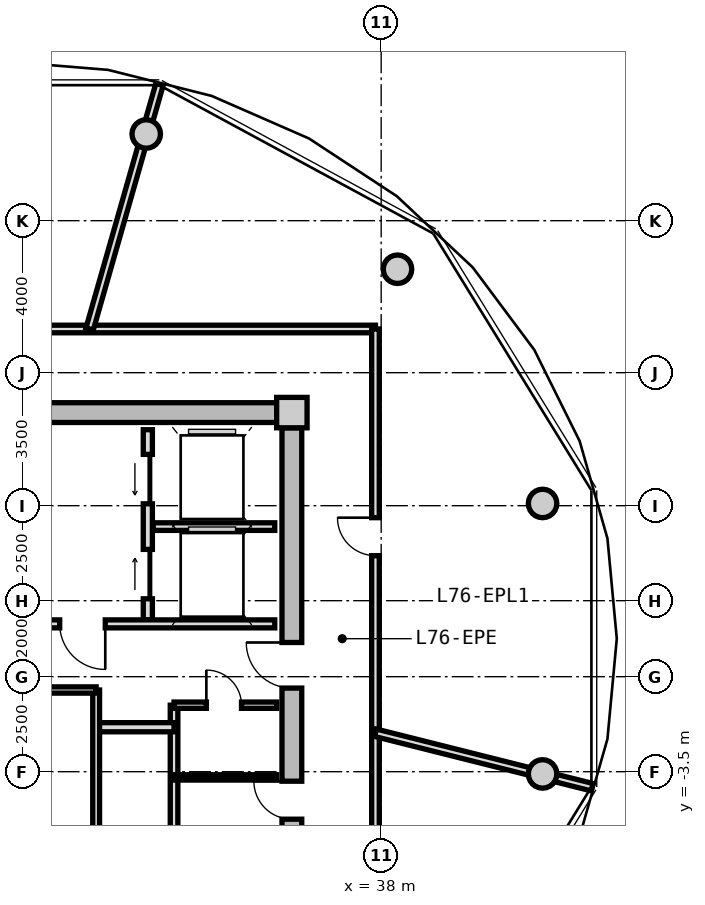
"""IFC4 building model, lengths in metres.
Left out: names, types, materials, properties, quantities, classifications, styles, units other than length and angle.
Written with IfcOpenShell. Run it as: python <this file> out.ifc"""

import sys

from ifc_helpers import new_model, si_unit, direction, frame, frame_2d, origin, origin_2d, place, context, subcontext, project, spatial, rectangle, circle, extrude, source, transform, mapped, element, fill, save


model = new_model("IFC4")
c1 = context("Model", 3, precision=1e-05, world=origin(), true_north=direction((0.0, 1.0)))
c2 = subcontext(c1, "Body", "Model", "MODEL_VIEW")
j1 = project(units=[si_unit("LENGTHUNIT", "METRE"), si_unit("PLANEANGLEUNIT", "RADIAN")], contexts=[c1])
p1 = place(None, origin())
s1 = spatial("IfcSite", under=j1, at=p1, CompositionType="ELEMENT")
p2 = place(p1, origin())
s2 = spatial("IfcBuilding", under=s1, at=p2, CompositionType="ELEMENT")
p3 = place(p2, frame((0.0, 0.0, 244.4)))
s3 = spatial("IfcBuildingStorey", under=s2, at=p3, CompositionType="ELEMENT", Elevation=244.4)
m1 = source(origin(), c2, "Body", "SweptSolid", [
    extrude(rectangle(XDim=0.8, YDim=0.8, at=origin_2d()), origin(), (0.0, 0.0, 1.0), 5.45),
])
p4 = place(p3, frame((35.65, 5.95, 0.0), z_axis=(0.0, 0.0, 1.0), x_axis=(1.0, 0.0, 0.0)))
e1 = element("IfcColumn", 1, at=p4, inside=s3, PredefinedType="COLUMN", context=c2, shape_type="MappedRepresentation", body=[
    mapped(m1, transform((0.0, 0.0, 0.0), x_axis=(1.0, 0.0, 0.0), y_axis=(0.0, 1.0, 0.0), z_axis=(0.0, 0.0, 1.0), scale=1.0)),
])
m2 = source(origin(), c2, "Body", "SweptSolid", [
    extrude(rectangle(XDim=14.5, YDim=0.52, at=frame_2d((7.25, 0.0))), origin(), (0.0, 0.0, 1.0), 5.175),
])
p5 = place(p3, frame((20.75, 5.95, 0.0), z_axis=(0.0, 0.0, 1.0), x_axis=(1.0, 0.0, 0.0)))
e2 = element("IfcWall", 2, at=p5, inside=s3, PredefinedType="SHEAR", context=c2, shape_type="MappedRepresentation", body=[
    mapped(m2, transform((0.0, 0.0, 0.0), x_axis=(1.0, 0.0, 0.0), y_axis=(0.0, 1.0, 0.0), z_axis=(0.0, 0.0, 1.0), scale=1.0)),
])
m3 = source(origin(), c2, "Body", "SweptSolid", [
    extrude(rectangle(XDim=11.1, YDim=0.52, at=frame_2d((5.55, 0.0))), origin(), (0.0, 0.0, 1.0), 5.175),
])
p6 = place(p3, frame((35.65, 5.55, 0.0), z_axis=(0.0, 0.0, 1.0), x_axis=(0.0, -1.0, 0.0)))
e3 = element("IfcWall", 3, at=p6, inside=s3, PredefinedType="SHEAR", context=c2, shape_type="MappedRepresentation", body=[
    mapped(m3, transform((0.0, 0.0, 0.0), x_axis=(1.0, 0.0, 0.0), y_axis=(0.0, 1.0, 0.0), z_axis=(0.0, 0.0, 1.0), scale=1.0)),
])
p7 = place(p6, frame((5.65, 0.0, 0.0)))
e4 = element("IfcOpeningElement", 4, at=p7, cuts=e3, PredefinedType="OPENING", context=c2, shape_type="SweptSolid", body=[
    extrude(rectangle(XDim=1.2, YDim=2.15, at=frame_2d((0.6, 1.075))), frame((0.0, 0.27, 0.0), z_axis=(0.0, -1.0, 0.0), x_axis=(1.0, 0.0, 0.0)), (0.0, 0.0, 1.0), 0.54),
])
p8 = place(p6, frame((9.3, 0.0, 0.0)))
e5 = element("IfcOpeningElement", 5, at=p8, cuts=e3, PredefinedType="OPENING", context=c2, shape_type="SweptSolid", body=[
    extrude(rectangle(XDim=1.0, YDim=2.1, at=frame_2d((0.5, 1.05))), frame((0.0, 0.27, 0.0), z_axis=(0.0, -1.0, 0.0), x_axis=(1.0, 0.0, 0.0)), (0.0, 0.0, 1.0), 0.54),
])
m4 = source(origin(), c2, "Body", "SweptSolid", [
    extrude(circle(Radius=0.375, at=origin_2d()), origin(), (0.0, 0.0, 1.0), 5.45),
])
for number, where, z_axis, x_axis in (
    (6, (42.247, 3.559, 0.0), (0.0, 0.0, 1.0), (1.0, 0.0, 0.0)),
    (7, (38.43, 9.723, 0.0), (0.0, 0.0, 1.0), (1.0, 0.0, 0.0)),
    (8, (31.818, 13.281, 0.0), (0.0, 0.0, 1.0), (1.0, 0.0, 0.0)),
    (9, (42.247, -3.559, 0.0), (0.0, 0.0, 1.0), (1.0, 0.0, 0.0)),
):
    element("IfcColumn", number, at=place(p3, frame(where, z_axis=z_axis, x_axis=x_axis)), inside=s3, PredefinedType="COLUMN", context=c2, shape_type="MappedRepresentation", body=[
        mapped(m4, transform((0.0, 0.0, 0.0), x_axis=(1.0, 0.0, 0.0), y_axis=(0.0, 1.0, 0.0), z_axis=(0.0, 0.0, 1.0), scale=1.0)),
    ])
m5 = source(origin(), c2, "Body", "SweptSolid", [
    extrude(rectangle(XDim=5.0, YDim=0.24, at=frame_2d((2.5, 0.0))), origin(), (0.0, 0.0, 1.0), 5.16),
])
p9 = place(p3, frame((31.86, 0.5, 0.0), z_axis=(0.0, 0.0, 1.0), x_axis=(0.0, 1.0, 0.0)))
e10 = element("IfcWall", 10, at=p9, inside=s3, PredefinedType="PARTITIONING", context=c2, shape_type="MappedRepresentation", body=[
    mapped(m5, transform((0.0, 0.0, 0.0), x_axis=(1.0, 0.0, 0.0), y_axis=(0.0, 1.0, 0.0), z_axis=(0.0, 0.0, 1.0), scale=1.0)),
])
p10 = place(p9, frame((3.05, 0.0, 0.0)))
e11 = element("IfcOpeningElement", 11, at=p10, cuts=e10, PredefinedType="OPENING", context=c2, shape_type="SweptSolid", body=[
    extrude(rectangle(XDim=1.3, YDim=2.2, at=frame_2d((0.65, 1.1))), frame((0.0, 0.13, 0.0), z_axis=(0.0, -1.0, 0.0), x_axis=(1.0, 0.0, 0.0)), (0.0, 0.0, 1.0), 0.26),
])
p11 = place(p9, frame((0.55, 0.0, 0.0)))
e12 = element("IfcOpeningElement", 12, at=p11, cuts=e10, PredefinedType="OPENING", context=c2, shape_type="SweptSolid", body=[
    extrude(rectangle(XDim=1.3, YDim=2.2, at=frame_2d((0.65, 1.1))), frame((0.0, 0.13, 0.0), z_axis=(0.0, -1.0, 0.0), x_axis=(1.0, 0.0, 0.0)), (0.0, 0.0, 1.0), 0.26),
])
m6 = source(origin(), c2, "Body", "SweptSolid", [
    extrude(rectangle(XDim=3.2, YDim=0.2, at=frame_2d((1.6, 0.0))), origin(), (0.0, 0.0, 1.0), 5.16),
])
p12 = place(p3, frame((32.0, 2.95, 0.0), z_axis=(0.0, 0.0, 1.0), x_axis=(1.0, 0.0, 0.0)))
e13 = element("IfcWall", 13, at=p12, inside=s3, PredefinedType="PARTITIONING", context=c2, shape_type="MappedRepresentation", body=[
    mapped(m6, transform((0.0, 0.0, 0.0), x_axis=(1.0, 0.0, 0.0), y_axis=(0.0, 1.0, 0.0), z_axis=(0.0, 0.0, 1.0), scale=1.0)),
])
m7 = source(origin(), c2, "Body", "SweptSolid", [
    extrude(rectangle(XDim=6.66, YDim=0.21, at=frame_2d((3.33, 0.0))), origin(), (0.0, 0.0, 1.0), 5.16),
])
p13 = place(p3, frame((28.54, 0.39, 0.0), z_axis=(0.0, 0.0, 1.0), x_axis=(1.0, 0.0, 0.0)))
e14 = element("IfcWall", 14, at=p13, inside=s3, PredefinedType="PARTITIONING", context=c2, shape_type="MappedRepresentation", body=[
    mapped(m7, transform((0.0, 0.0, 0.0), x_axis=(1.0, 0.0, 0.0), y_axis=(0.0, 1.0, 0.0), z_axis=(0.0, 0.0, 1.0), scale=1.0)),
])
p14 = place(p13, frame((1.0, 0.0, 0.0)))
e15 = element("IfcOpeningElement", 15, at=p14, cuts=e14, PredefinedType="OPENING", context=c2, shape_type="SweptSolid", body=[
    extrude(rectangle(XDim=1.2, YDim=2.15, at=frame_2d((0.6, 1.075))), frame((0.0, 0.115, 0.0), z_axis=(0.0, -1.0, 0.0), x_axis=(1.0, 0.0, 0.0)), (0.0, 0.0, 1.0), 0.23),
])
m8 = source(origin(), c2, "Body", "SweptSolid", [
    extrude(rectangle(XDim=3.8, YDim=0.2, at=frame_2d((1.9, 0.0))), origin(), (0.0, 0.0, 1.0), 5.16),
])
p15 = place(p3, frame((32.55, -5.55, 0.0), z_axis=(0.0, 0.0, 1.0), x_axis=(0.0, 1.0, 0.0)))
e16 = element("IfcWall", 16, at=p15, inside=s3, PredefinedType="PARTITIONING", context=c2, shape_type="MappedRepresentation", body=[
    mapped(m8, transform((0.0, 0.0, 0.0), x_axis=(1.0, 0.0, 0.0), y_axis=(0.0, 1.0, 0.0), z_axis=(0.0, 0.0, 1.0), scale=1.0)),
])
m9 = source(origin(), c2, "Body", "SweptSolid", [
    extrude(rectangle(XDim=2.05, YDim=0.24, at=frame_2d((1.025, 0.0))), origin(), (0.0, 0.0, 1.0), 5.16),
])
p16 = place(p3, frame((30.5, -2.33, 0.0), z_axis=(0.0, 0.0, 1.0), x_axis=(1.0, 0.0, 0.0)))
e17 = element("IfcWall", 17, at=p16, inside=s3, PredefinedType="PARTITIONING", context=c2, shape_type="MappedRepresentation", body=[
    mapped(m9, transform((0.0, 0.0, 0.0), x_axis=(1.0, 0.0, 0.0), y_axis=(0.0, 1.0, 0.0), z_axis=(0.0, 0.0, 1.0), scale=1.0)),
])
m10 = source(origin(), c2, "Body", "SweptSolid", [
    extrude(rectangle(XDim=4.2, YDim=0.18, at=frame_2d((2.1, 0.0))), origin(), (0.0, 0.0, 1.0), 5.16),
])
p17 = place(p3, frame((30.5, -5.55, 0.0), z_axis=(0.0, 0.0, 1.0), x_axis=(0.0, 1.0, 0.0)))
e18 = element("IfcWall", 18, at=p17, inside=s3, PredefinedType="PARTITIONING", context=c2, shape_type="MappedRepresentation", body=[
    mapped(m10, transform((0.0, 0.0, 0.0), x_axis=(1.0, 0.0, 0.0), y_axis=(0.0, 1.0, 0.0), z_axis=(0.0, 0.0, 1.0), scale=1.0)),
])
m11 = source(origin(), c2, "Body", "SweptSolid", [
    extrude(rectangle(XDim=4.77, YDim=0.165, at=frame_2d((2.385, 0.0))), origin(), (0.0, 0.0, 1.0), 5.16),
])
p18 = place(p3, frame((25.73, -1.35, 0.0), z_axis=(0.0, 0.0, 1.0), x_axis=(1.0, 0.0, 0.0)))
e19 = element("IfcWall", 19, at=p18, inside=s3, PredefinedType="PARTITIONING", context=c2, shape_type="MappedRepresentation", body=[
    mapped(m11, transform((0.0, 0.0, 0.0), x_axis=(1.0, 0.0, 0.0), y_axis=(0.0, 1.0, 0.0), z_axis=(0.0, 0.0, 1.0), scale=1.0)),
])
p19 = place(p18, frame((1.85, 0.0, 0.0)))
e20 = element("IfcOpeningElement", 20, at=p19, cuts=e19, PredefinedType="OPENING", context=c2, shape_type="SweptSolid", body=[
    extrude(rectangle(XDim=1.0, YDim=2.1, at=frame_2d((0.5, 1.05))), frame((0.0, 0.093, 0.0), z_axis=(0.0, -1.0, 0.0), x_axis=(1.0, 0.0, 0.0)), (0.0, 0.0, 1.0), 0.185),
])
m12 = source(origin(), c2, "Body", "SweptSolid", [
    extrude(rectangle(XDim=2.7, YDim=0.165, at=frame_2d((1.35, 0.0))), origin(), (0.0, 0.0, 1.0), 5.16),
])
p20 = place(p3, frame((32.55, -1.75, 0.0), z_axis=(0.0, 0.0, 1.0), x_axis=(1.0, 0.0, 0.0)))
e21 = element("IfcWall", 21, at=p20, inside=s3, PredefinedType="PARTITIONING", context=c2, shape_type="MappedRepresentation", body=[
    mapped(m12, transform((0.0, 0.0, 0.0), x_axis=(1.0, 0.0, 0.0), y_axis=(0.0, 1.0, 0.0), z_axis=(0.0, 0.0, 1.0), scale=1.0)),
])
p21 = place(p20, frame((0.85, 0.0, 0.0)))
e22 = element("IfcOpeningElement", 22, at=p21, cuts=e21, PredefinedType="OPENING", context=c2, shape_type="SweptSolid", body=[
    extrude(rectangle(XDim=0.925, YDim=2.1, at=frame_2d((0.462, 1.05))), frame((0.0, 0.093, 0.0), z_axis=(0.0, -1.0, 0.0), x_axis=(1.0, 0.0, 0.0)), (0.0, 0.0, 1.0), 0.185),
])
m13 = source(origin(), c2, "Body", "SweptSolid", [
    extrude(rectangle(XDim=2.7, YDim=0.14, at=frame_2d((1.35, 0.0))), origin(), (0.0, 0.0, 1.0), 5.16),
])
p22 = place(p3, frame((32.55, -3.65, 0.0), z_axis=(0.0, 0.0, 1.0), x_axis=(1.0, 0.0, 0.0)))
e23 = element("IfcWall", 23, at=p22, inside=s3, PredefinedType="PARTITIONING", context=c2, shape_type="MappedRepresentation", body=[
    mapped(m13, transform((0.0, 0.0, 0.0), x_axis=(1.0, 0.0, 0.0), y_axis=(0.0, 1.0, 0.0), z_axis=(0.0, 0.0, 1.0), scale=1.0)),
])
m14 = source(origin(), c2, "Body", "SweptSolid", [
    extrude(rectangle(XDim=19.7, YDim=0.2, at=frame_2d((9.85, 0.0))), origin(), (0.0, 0.0, 1.0), 5.16),
])
p23 = place(p3, frame((18.15, 8.15, 0.0), z_axis=(0.0, 0.0, 1.0), x_axis=(1.0, 0.0, 0.0)))
e24 = element("IfcWall", 24, at=p23, inside=s3, PredefinedType="PARTITIONING", context=c2, shape_type="MappedRepresentation", body=[
    mapped(m14, transform((0.0, 0.0, 0.0), x_axis=(1.0, 0.0, 0.0), y_axis=(0.0, 1.0, 0.0), z_axis=(0.0, 0.0, 1.0), scale=1.0)),
])
p24 = place(p23, frame((5.725, 0.0, 0.0)))
e25 = element("IfcOpeningElement", 25, at=p24, cuts=e24, PredefinedType="OPENING", context=c2, shape_type="SweptSolid", body=[
    extrude(rectangle(XDim=1.0, YDim=2.1, at=frame_2d((0.5, 1.05))), frame((0.0, 0.11, 0.0), z_axis=(0.0, -1.0, 0.0), x_axis=(1.0, 0.0, 0.0)), (0.0, 0.0, 1.0), 0.22),
])
m15 = source(origin(), c2, "Body", "SweptSolid", [
    extrude(rectangle(XDim=16.3, YDim=0.2, at=frame_2d((8.15, 0.0))), origin(), (0.0, 0.0, 1.0), 5.16),
])
p25 = place(p3, frame((37.85, 8.15, 0.0), z_axis=(0.0, 0.0, 1.0), x_axis=(0.0, -1.0, 0.0)))
e26 = element("IfcWall", 26, at=p25, inside=s3, PredefinedType="PARTITIONING", context=c2, shape_type="MappedRepresentation", body=[
    mapped(m15, transform((0.0, 0.0, 0.0), x_axis=(1.0, 0.0, 0.0), y_axis=(0.0, 1.0, 0.0), z_axis=(0.0, 0.0, 1.0), scale=1.0)),
])
p26 = place(p25, frame((4.966, 0.0, 0.0)))
e27 = element("IfcOpeningElement", 27, at=p26, cuts=e26, PredefinedType="OPENING", context=c2, shape_type="SweptSolid", body=[
    extrude(rectangle(XDim=1.0, YDim=2.1, at=frame_2d((0.5, 1.05))), frame((0.0, 0.11, 0.0), z_axis=(0.0, -1.0, 0.0), x_axis=(1.0, 0.0, 0.0)), (0.0, 0.0, 1.0), 0.22),
])
m16 = source(origin(), c2, "Body", "SweptSolid", [
    extrude(rectangle(XDim=5.879, YDim=0.2, at=frame_2d((2.939, 0.0))), origin(), (0.0, 0.0, 1.0), 4.76),
])
p27 = place(p3, frame((37.85, -2.475, 0.0), z_axis=(0.0, 0.0, 1.0), x_axis=(0.96984127658, -0.24373735504, 0.0)))
e28 = element("IfcWall", 28, at=p27, inside=s3, PredefinedType="PARTITIONING", context=c2, shape_type="MappedRepresentation", body=[
    mapped(m16, transform((0.0, 0.0, 0.0), x_axis=(1.0, 0.0, 0.0), y_axis=(0.0, 1.0, 0.0), z_axis=(0.0, 0.0, 1.0), scale=1.0)),
])
m17 = source(origin(), c2, "Body", "SweptSolid", [
    extrude(rectangle(XDim=6.693, YDim=0.2, at=frame_2d((3.347, 0.0))), origin(), (0.0, 0.0, 1.0), 4.76),
])
p28 = place(p3, frame((30.328, 8.15, 0.0), z_axis=(0.0, 0.0, 1.0), x_axis=(0.2747066748, 0.96152807698, 0.0)))
e29 = element("IfcWall", 29, at=p28, inside=s3, PredefinedType="PARTITIONING", context=c2, shape_type="MappedRepresentation", body=[
    mapped(m17, transform((0.0, 0.0, 0.0), x_axis=(1.0, 0.0, 0.0), y_axis=(0.0, 1.0, 0.0), z_axis=(0.0, 0.0, 1.0), scale=1.0)),
])
m18 = source(origin(), c2, "Body", "SweptSolid", [
    extrude(rectangle(XDim=1.3, YDim=2.2, at=frame_2d((0.65, 1.1))), frame((0.0, 0.025, 0.0), z_axis=(0.0, -1.0, 0.0), x_axis=(1.0, 0.0, 0.0)), (0.0, 0.0, 1.0), 0.05),
])
p29 = place(p10, origin())
e30 = element("IfcDoor", 30, at=p29, inside=s3, OperationType="SLIDING_TO_LEFT", PredefinedType="DOOR", context=c2, shape_type="MappedRepresentation", body=[
    mapped(m18, transform((0.0, 0.0, 0.0), x_axis=(1.0, 0.0, 0.0), y_axis=(0.0, 1.0, 0.0), z_axis=(0.0, 0.0, 1.0), scale=1.0)),
])
fill(e11, e30)
p30 = place(p11, origin())
e31 = element("IfcDoor", 31, at=p30, inside=s3, OperationType="SLIDING_TO_RIGHT", PredefinedType="DOOR", context=c2, shape_type="MappedRepresentation", body=[
    mapped(m18, transform((0.0, 0.0, 0.0), x_axis=(1.0, 0.0, 0.0), y_axis=(0.0, 1.0, 0.0), z_axis=(0.0, 0.0, 1.0), scale=1.0)),
])
fill(e12, e31)
m19 = source(origin(), c2, "Body", "SweptSolid", [
    extrude(rectangle(XDim=1.2, YDim=2.15, at=frame_2d((0.6, 1.075))), frame((0.0, 0.025, 0.0), z_axis=(0.0, -1.0, 0.0), x_axis=(1.0, 0.0, 0.0)), (0.0, 0.0, 1.0), 0.05),
])
p31 = place(p14, frame((1.2, 0.0, 0.0), z_axis=(0.0, 0.0, 1.0), x_axis=(-1.0, 0.0, 0.0)))
e32 = element("IfcDoor", 32, at=p31, inside=s3, OperationType="SINGLE_SWING_LEFT", PredefinedType="DOOR", context=c2, shape_type="MappedRepresentation", body=[
    mapped(m19, transform((0.0, 0.0, 0.0), x_axis=(1.0, 0.0, 0.0), y_axis=(0.0, 1.0, 0.0), z_axis=(0.0, 0.0, 1.0), scale=1.0)),
])
fill(e15, e32)
p32 = place(p7, frame((1.2, 0.0, 0.0), z_axis=(0.0, 0.0, 1.0), x_axis=(-1.0, 0.0, 0.0)))
e33 = element("IfcDoor", 33, at=p32, inside=s3, OperationType="SINGLE_SWING_RIGHT", PredefinedType="DOOR", context=c2, shape_type="MappedRepresentation", body=[
    mapped(m19, transform((0.0, 0.0, 0.0), x_axis=(1.0, 0.0, 0.0), y_axis=(0.0, 1.0, 0.0), z_axis=(0.0, 0.0, 1.0), scale=1.0)),
])
fill(e4, e33)
m20 = source(origin(), c2, "Body", "SweptSolid", [
    extrude(rectangle(XDim=0.925, YDim=2.1, at=frame_2d((0.462, 1.05))), frame((0.0, 0.025, 0.0), z_axis=(0.0, -1.0, 0.0), x_axis=(1.0, 0.0, 0.0)), (0.0, 0.0, 1.0), 0.05),
])
p33 = place(p21, origin())
e34 = element("IfcDoor", 34, at=p33, inside=s3, OperationType="SINGLE_SWING_LEFT", PredefinedType="DOOR", context=c2, shape_type="MappedRepresentation", body=[
    mapped(m20, transform((0.0, 0.0, 0.0), x_axis=(1.0, 0.0, 0.0), y_axis=(0.0, 1.0, 0.0), z_axis=(0.0, 0.0, 1.0), scale=1.0)),
])
fill(e22, e34)
m21 = source(origin(), c2, "Body", "SweptSolid", [
    extrude(rectangle(XDim=1.0, YDim=2.1, at=frame_2d((0.5, 1.05))), frame((0.0, 0.025, 0.0), z_axis=(0.0, -1.0, 0.0), x_axis=(1.0, 0.0, 0.0)), (0.0, 0.0, 1.0), 0.05),
])
p34 = place(p8, frame((1.0, 0.0, 0.0), z_axis=(0.0, 0.0, 1.0), x_axis=(-1.0, 0.0, 0.0)))
e35 = element("IfcDoor", 35, at=p34, inside=s3, OperationType="SINGLE_SWING_RIGHT", PredefinedType="DOOR", context=c2, shape_type="MappedRepresentation", body=[
    mapped(m21, transform((0.0, 0.0, 0.0), x_axis=(1.0, 0.0, 0.0), y_axis=(0.0, 1.0, 0.0), z_axis=(0.0, 0.0, 1.0), scale=1.0)),
])
fill(e5, e35)
p35 = place(p26, frame((1.0, 0.0, 0.0), z_axis=(0.0, 0.0, 1.0), x_axis=(-1.0, 0.0, 0.0)))
e36 = element("IfcDoor", 36, at=p35, inside=s3, OperationType="SINGLE_SWING_RIGHT", PredefinedType="DOOR", context=c2, shape_type="MappedRepresentation", body=[
    mapped(m21, transform((0.0, 0.0, 0.0), x_axis=(1.0, 0.0, 0.0), y_axis=(0.0, 1.0, 0.0), z_axis=(0.0, 0.0, 1.0), scale=1.0)),
])
fill(e27, e36)
save(model, sys.argv[1])
